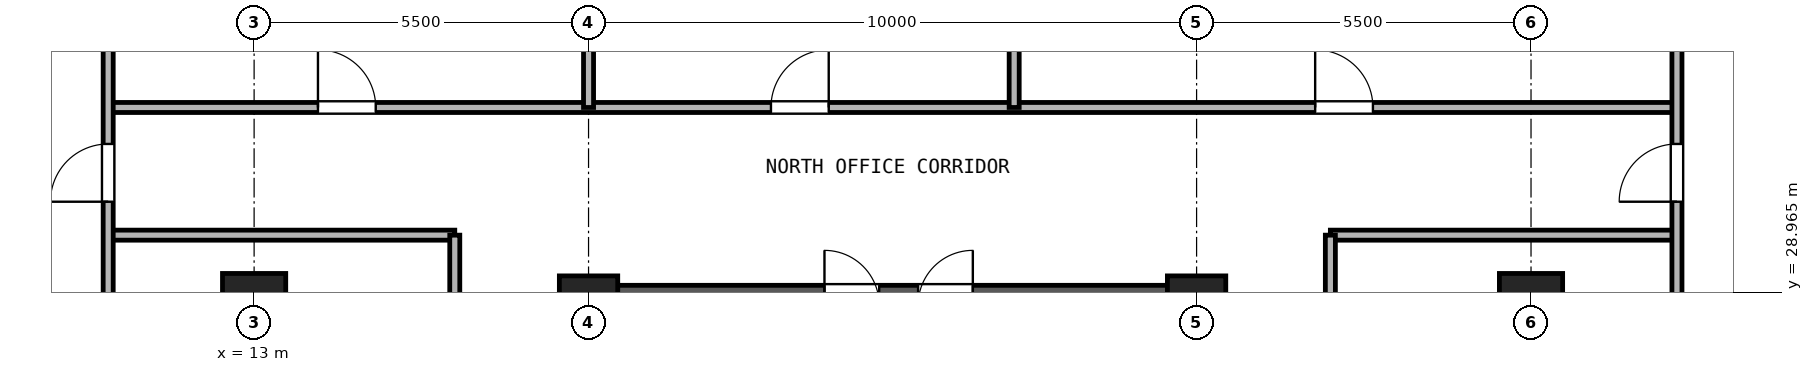
"""IFC4 building model, lengths in metres.
Left out: names, types, materials, properties, quantities, classifications, styles, units other than length and angle.
Written with IfcOpenShell. Run it as: python <this file> out.ifc"""

import sys

from ifc_helpers import new_model, si_unit, direction, frame, frame_2d, origin, origin_2d, place, context, subcontext, project, spatial, rectangle, hollow_rectangle, extrude, source, transform, mapped, element, fill, save


model = new_model("IFC4")
c1 = context("Model", 3, precision=1e-05, world=origin(), true_north=direction((0.0, 1.0)))
c2 = subcontext(c1, "Body", "Model", "MODEL_VIEW")
j1 = project(units=[si_unit("LENGTHUNIT", "METRE"), si_unit("PLANEANGLEUNIT", "RADIAN")], contexts=[c1])
p1 = place(None, origin())
s1 = spatial("IfcSite", under=j1, at=p1, CompositionType="ELEMENT")
p2 = place(p1, origin())
s2 = spatial("IfcBuilding", under=s1, at=p2, CompositionType="ELEMENT")
p3 = place(p2, frame((0.0, 0.0, 47.7)))
s3 = spatial("IfcBuildingStorey", under=s2, at=p3, CompositionType="ELEMENT", Elevation=47.7)
m1 = source(origin(), c2, "Body", "SweptSolid", [
    extrude(hollow_rectangle(XDim=1.04, YDim=1.04, WallThickness=0.065, at=origin_2d()), origin(), (0.0, 0.0, 1.0), 3.32),
])
p4 = place(p3, frame((13.0, 28.75, 0.0), z_axis=(0.0, 0.0, 1.0), x_axis=(1.0, 0.0, 0.0)))
e1 = element("IfcColumn", 1, at=p4, inside=s3, PredefinedType="COLUMN", context=c2, shape_type="MappedRepresentation", body=[
    mapped(m1, transform((0.0, 0.0, 0.0), x_axis=(1.0, 0.0, 0.0), y_axis=(0.0, 1.0, 0.0), z_axis=(0.0, 0.0, 1.0), scale=1.0)),
])
m2 = source(origin(), c2, "Body", "SweptSolid", [
    extrude(hollow_rectangle(XDim=0.96, YDim=0.96, WallThickness=0.06, at=origin_2d()), origin(), (0.0, 0.0, 1.0), 3.32),
])
for number, where, z_axis, x_axis in (
    (2, (18.5, 28.75, 0.0), (0.0, 0.0, 1.0), (1.0, 0.0, 0.0)),
    (3, (28.5, 28.75, 0.0), (0.0, 0.0, 1.0), (1.0, 0.0, 0.0)),
):
    element("IfcColumn", number, at=place(p3, frame(where, z_axis=z_axis, x_axis=x_axis)), inside=s3, PredefinedType="COLUMN", context=c2, shape_type="MappedRepresentation", body=[
        mapped(m2, transform((0.0, 0.0, 0.0), x_axis=(1.0, 0.0, 0.0), y_axis=(0.0, 1.0, 0.0), z_axis=(0.0, 0.0, 1.0), scale=1.0)),
    ])
p5 = place(p3, frame((34.0, 28.75, 0.0), z_axis=(0.0, 0.0, 1.0), x_axis=(1.0, 0.0, 0.0)))
e4 = element("IfcColumn", 4, at=p5, inside=s3, PredefinedType="COLUMN", context=c2, shape_type="MappedRepresentation", body=[
    mapped(m1, transform((0.0, 0.0, 0.0), x_axis=(1.0, 0.0, 0.0), y_axis=(0.0, 1.0, 0.0), z_axis=(0.0, 0.0, 1.0), scale=1.0)),
])
p6 = place(p3, frame((18.175, 28.75, 0.0), z_axis=(0.0, 0.0, 1.0), x_axis=(1.0, 0.0, 0.0)))
e5 = element("IfcWall", 5, at=p6, inside=s3, PredefinedType="SHEAR", context=c2, shape_type="SweptSolid", body=[
    extrude(rectangle(XDim=10.65, YDim=0.65, at=frame_2d((5.325, 0.0))), origin(), (0.0, 0.0, 1.0), 3.32),
])
p7 = place(p6, frame((4.205, 0.0, 0.0)))
e6 = element("IfcOpeningElement", 6, at=p7, cuts=e5, PredefinedType="OPENING", context=c2, shape_type="SweptSolid", body=[
    extrude(rectangle(XDim=0.9, YDim=2.05, at=frame_2d((0.45, 1.025))), frame((0.0, 0.335, 0.0), z_axis=(0.0, -1.0, 0.0), x_axis=(1.0, 0.0, 0.0)), (0.0, 0.0, 1.0), 0.67),
])
p8 = place(p6, frame((5.745, 0.0, 0.0)))
e7 = element("IfcOpeningElement", 7, at=p8, cuts=e5, PredefinedType="OPENING", context=c2, shape_type="SweptSolid", body=[
    extrude(rectangle(XDim=0.9, YDim=2.05, at=frame_2d((0.45, 1.025))), frame((0.0, 0.335, 0.0), z_axis=(0.0, -1.0, 0.0), x_axis=(1.0, 0.0, 0.0)), (0.0, 0.0, 1.0), 0.67),
])
p9 = place(p3, frame((10.6, 32.0, 0.0), z_axis=(0.0, 0.0, 1.0), x_axis=(1.0, 0.0, 0.0)))
e8 = element("IfcWall", 8, at=p9, inside=s3, PredefinedType="PARTITIONING", context=c2, shape_type="SweptSolid", body=[
    extrude(rectangle(XDim=25.8, YDim=0.165, at=frame_2d((12.9, 0.0))), origin(), (0.0, 0.0, 1.0), 3.32),
])
p10 = place(p9, frame((3.45, 0.0, 0.0)))
e9 = element("IfcOpeningElement", 9, at=p10, cuts=e8, PredefinedType="OPENING", context=c2, shape_type="SweptSolid", body=[
    extrude(rectangle(XDim=0.95, YDim=2.15, at=frame_2d((0.475, 1.075))), frame((0.0, 0.093, 0.0), z_axis=(0.0, -1.0, 0.0), x_axis=(1.0, 0.0, 0.0)), (0.0, 0.0, 1.0), 0.185),
])
p11 = place(p9, frame((10.9, 0.0, 0.0)))
e10 = element("IfcOpeningElement", 10, at=p11, cuts=e8, PredefinedType="OPENING", context=c2, shape_type="SweptSolid", body=[
    extrude(rectangle(XDim=0.95, YDim=2.15, at=frame_2d((0.475, 1.075))), frame((0.0, 0.093, 0.0), z_axis=(0.0, -1.0, 0.0), x_axis=(1.0, 0.0, 0.0)), (0.0, 0.0, 1.0), 0.185),
])
p12 = place(p9, frame((19.85, 0.0, 0.0)))
e11 = element("IfcOpeningElement", 11, at=p12, cuts=e8, PredefinedType="OPENING", context=c2, shape_type="SweptSolid", body=[
    extrude(rectangle(XDim=0.95, YDim=2.15, at=frame_2d((0.475, 1.075))), frame((0.0, 0.093, 0.0), z_axis=(0.0, -1.0, 0.0), x_axis=(1.0, 0.0, 0.0)), (0.0, 0.0, 1.0), 0.185),
])
for number, where, z_axis, x_axis in (
    (12, (10.6, 29.9, 0.0), (0.0, 0.0, 1.0), (1.0, 0.0, 0.0)),
    (13, (30.7, 29.9, 0.0), (0.0, 0.0, 1.0), (1.0, 0.0, 0.0)),
):
    element("IfcWall", number, at=place(p3, frame(where, z_axis=z_axis, x_axis=x_axis)), inside=s3, PredefinedType="PARTITIONING", context=c2, shape_type="SweptSolid", body=[
        extrude(rectangle(XDim=5.7, YDim=0.165, at=frame_2d((2.85, 0.0))), origin(), (0.0, 0.0, 1.0), 3.32),
    ])
p13 = place(p3, frame((16.3, 10.2, 0.0), z_axis=(0.0, 0.0, 1.0), x_axis=(0.0, 1.0, 0.0)))
e14 = element("IfcWall", 14, at=p13, inside=s3, PredefinedType="PARTITIONING", context=c2, shape_type="SweptSolid", body=[
    extrude(rectangle(XDim=19.7, YDim=0.165, at=frame_2d((9.85, 0.0))), origin(), (0.0, 0.0, 1.0), 3.32),
])
p14 = place(p13, frame((5.859, 0.0, 0.0)))
e15 = element("IfcOpeningElement", 15, at=p14, cuts=e14, PredefinedType="OPENING", context=c2, shape_type="SweptSolid", body=[
    extrude(rectangle(XDim=0.95, YDim=2.15, at=frame_2d((0.475, 1.075))), frame((0.0, 0.093, 0.0), z_axis=(0.0, -1.0, 0.0), x_axis=(1.0, 0.0, 0.0)), (0.0, 0.0, 1.0), 0.185),
])
p15 = place(p13, frame((15.709, 0.0, 0.0)))
e16 = element("IfcOpeningElement", 16, at=p15, cuts=e14, PredefinedType="OPENING", context=c2, shape_type="SweptSolid", body=[
    extrude(rectangle(XDim=0.95, YDim=2.15, at=frame_2d((0.475, 1.075))), frame((0.0, 0.093, 0.0), z_axis=(0.0, -1.0, 0.0), x_axis=(1.0, 0.0, 0.0)), (0.0, 0.0, 1.0), 0.185),
])
p16 = place(p3, frame((30.7, 10.2, 0.0), z_axis=(0.0, 0.0, 1.0), x_axis=(0.0, 1.0, 0.0)))
e17 = element("IfcWall", 17, at=p16, inside=s3, PredefinedType="PARTITIONING", context=c2, shape_type="SweptSolid", body=[
    extrude(rectangle(XDim=19.7, YDim=0.165, at=frame_2d((9.85, 0.0))), origin(), (0.0, 0.0, 1.0), 3.32),
])
p17 = place(p16, frame((9.35, 0.0, 0.0)))
e18 = element("IfcOpeningElement", 18, at=p17, cuts=e17, PredefinedType="OPENING", context=c2, shape_type="SweptSolid", body=[
    extrude(rectangle(XDim=0.95, YDim=2.15, at=frame_2d((0.475, 1.075))), frame((0.0, 0.093, 0.0), z_axis=(0.0, -1.0, 0.0), x_axis=(1.0, 0.0, 0.0)), (0.0, 0.0, 1.0), 0.185),
])
p18 = place(p3, frame((10.6, 0.16, 0.0), z_axis=(0.0, 0.0, 1.0), x_axis=(0.0, 1.0, 0.0)))
e19 = element("IfcWall", 19, at=p18, inside=s3, PredefinedType="PARTITIONING", context=c2, shape_type="SweptSolid", body=[
    extrude(rectangle(XDim=40.18, YDim=0.165, at=frame_2d((20.09, 0.0))), origin(), (0.0, 0.0, 1.0), 3.32),
])
p19 = place(p18, frame((8.49, 0.0, 0.0)))
e20 = element("IfcOpeningElement", 20, at=p19, cuts=e19, PredefinedType="OPENING", context=c2, shape_type="SweptSolid", body=[
    extrude(rectangle(XDim=0.95, YDim=2.15, at=frame_2d((0.475, 1.075))), frame((0.0, 0.093, 0.0), z_axis=(0.0, -1.0, 0.0), x_axis=(1.0, 0.0, 0.0)), (0.0, 0.0, 1.0), 0.185),
])
p20 = place(p18, frame((30.29, 0.0, 0.0)))
e21 = element("IfcOpeningElement", 21, at=p20, cuts=e19, PredefinedType="OPENING", context=c2, shape_type="SweptSolid", body=[
    extrude(rectangle(XDim=0.95, YDim=2.15, at=frame_2d((0.475, 1.075))), frame((0.0, 0.093, 0.0), z_axis=(0.0, -1.0, 0.0), x_axis=(1.0, 0.0, 0.0)), (0.0, 0.0, 1.0), 0.185),
])
p21 = place(p3, frame((36.4, 0.16, 0.0), z_axis=(0.0, 0.0, 1.0), x_axis=(0.0, 1.0, 0.0)))
e22 = element("IfcWall", 22, at=p21, inside=s3, PredefinedType="PARTITIONING", context=c2, shape_type="SweptSolid", body=[
    extrude(rectangle(XDim=40.18, YDim=0.165, at=frame_2d((20.09, 0.0))), origin(), (0.0, 0.0, 1.0), 3.32),
])
p22 = place(p21, frame((8.49, 0.0, 0.0)))
e23 = element("IfcOpeningElement", 23, at=p22, cuts=e22, PredefinedType="OPENING", context=c2, shape_type="SweptSolid", body=[
    extrude(rectangle(XDim=0.95, YDim=2.15, at=frame_2d((0.475, 1.075))), frame((0.0, 0.093, 0.0), z_axis=(0.0, -1.0, 0.0), x_axis=(1.0, 0.0, 0.0)), (0.0, 0.0, 1.0), 0.185),
])
p23 = place(p21, frame((30.29, 0.0, 0.0)))
e24 = element("IfcOpeningElement", 24, at=p23, cuts=e22, PredefinedType="OPENING", context=c2, shape_type="SweptSolid", body=[
    extrude(rectangle(XDim=0.95, YDim=2.15, at=frame_2d((0.475, 1.075))), frame((0.0, 0.093, 0.0), z_axis=(0.0, -1.0, 0.0), x_axis=(1.0, 0.0, 0.0)), (0.0, 0.0, 1.0), 0.185),
])
p24 = place(p3, frame((18.5, 32.0, 0.0), z_axis=(0.0, 0.0, 1.0), x_axis=(0.0, 1.0, 0.0)))
e25 = element("IfcWall", 25, at=p24, inside=s3, PredefinedType="PARTITIONING", context=c2, shape_type="SweptSolid", body=[
    extrude(rectangle(XDim=8.34, YDim=0.165, at=frame_2d((4.17, 0.0))), origin(), (0.0, 0.0, 1.0), 2.539),
])
p25 = place(p3, frame((25.5, 32.0, 0.0), z_axis=(0.0, 0.0, 1.0), x_axis=(0.0, 1.0, 0.0)))
e26 = element("IfcWall", 26, at=p25, inside=s3, PredefinedType="PARTITIONING", context=c2, shape_type="SweptSolid", body=[
    extrude(rectangle(XDim=8.34, YDim=0.165, at=frame_2d((4.17, 0.0))), origin(), (0.0, 0.0, 1.0), 3.32),
])
p26 = place(p10, origin())
e27 = element("IfcDoor", 27, at=p26, inside=s3, OperationType="SINGLE_SWING_LEFT", PredefinedType="DOOR", context=c2, shape_type="SweptSolid", body=[
    extrude(rectangle(XDim=0.95, YDim=2.15, at=frame_2d((0.475, 1.075))), frame((0.0, 0.025, 0.0), z_axis=(0.0, -1.0, 0.0), x_axis=(1.0, 0.0, 0.0)), (0.0, 0.0, 1.0), 0.05),
])
fill(e9, e27)
p27 = place(p11, origin())
e28 = element("IfcDoor", 28, at=p27, inside=s3, OperationType="SINGLE_SWING_RIGHT", PredefinedType="DOOR", context=c2, shape_type="SweptSolid", body=[
    extrude(rectangle(XDim=0.95, YDim=2.15, at=frame_2d((0.475, 1.075))), frame((0.0, 0.025, 0.0), z_axis=(0.0, -1.0, 0.0), x_axis=(1.0, 0.0, 0.0)), (0.0, 0.0, 1.0), 0.05),
])
fill(e10, e28)
p28 = place(p12, origin())
e29 = element("IfcDoor", 29, at=p28, inside=s3, OperationType="SINGLE_SWING_LEFT", PredefinedType="DOOR", context=c2, shape_type="SweptSolid", body=[
    extrude(rectangle(XDim=0.95, YDim=2.15, at=frame_2d((0.475, 1.075))), frame((0.0, 0.025, 0.0), z_axis=(0.0, -1.0, 0.0), x_axis=(1.0, 0.0, 0.0)), (0.0, 0.0, 1.0), 0.05),
])
fill(e11, e29)
p29 = place(p20, frame((0.95, 0.0, 0.0), z_axis=(0.0, 0.0, 1.0), x_axis=(-1.0, 0.0, 0.0)))
e30 = element("IfcDoor", 30, at=p29, inside=s3, OperationType="SINGLE_SWING_LEFT", PredefinedType="DOOR", context=c2, shape_type="SweptSolid", body=[
    extrude(rectangle(XDim=0.95, YDim=2.15, at=frame_2d((0.475, 1.075))), frame((0.0, 0.025, 0.0), z_axis=(0.0, -1.0, 0.0), x_axis=(1.0, 0.0, 0.0)), (0.0, 0.0, 1.0), 0.05),
])
fill(e21, e30)
p30 = place(p23, origin())
e31 = element("IfcDoor", 31, at=p30, inside=s3, OperationType="SINGLE_SWING_LEFT", PredefinedType="DOOR", context=c2, shape_type="SweptSolid", body=[
    extrude(rectangle(XDim=0.95, YDim=2.15, at=frame_2d((0.475, 1.075))), frame((0.0, 0.025, 0.0), z_axis=(0.0, -1.0, 0.0), x_axis=(1.0, 0.0, 0.0)), (0.0, 0.0, 1.0), 0.05),
])
fill(e24, e31)
save(model, sys.argv[1])
